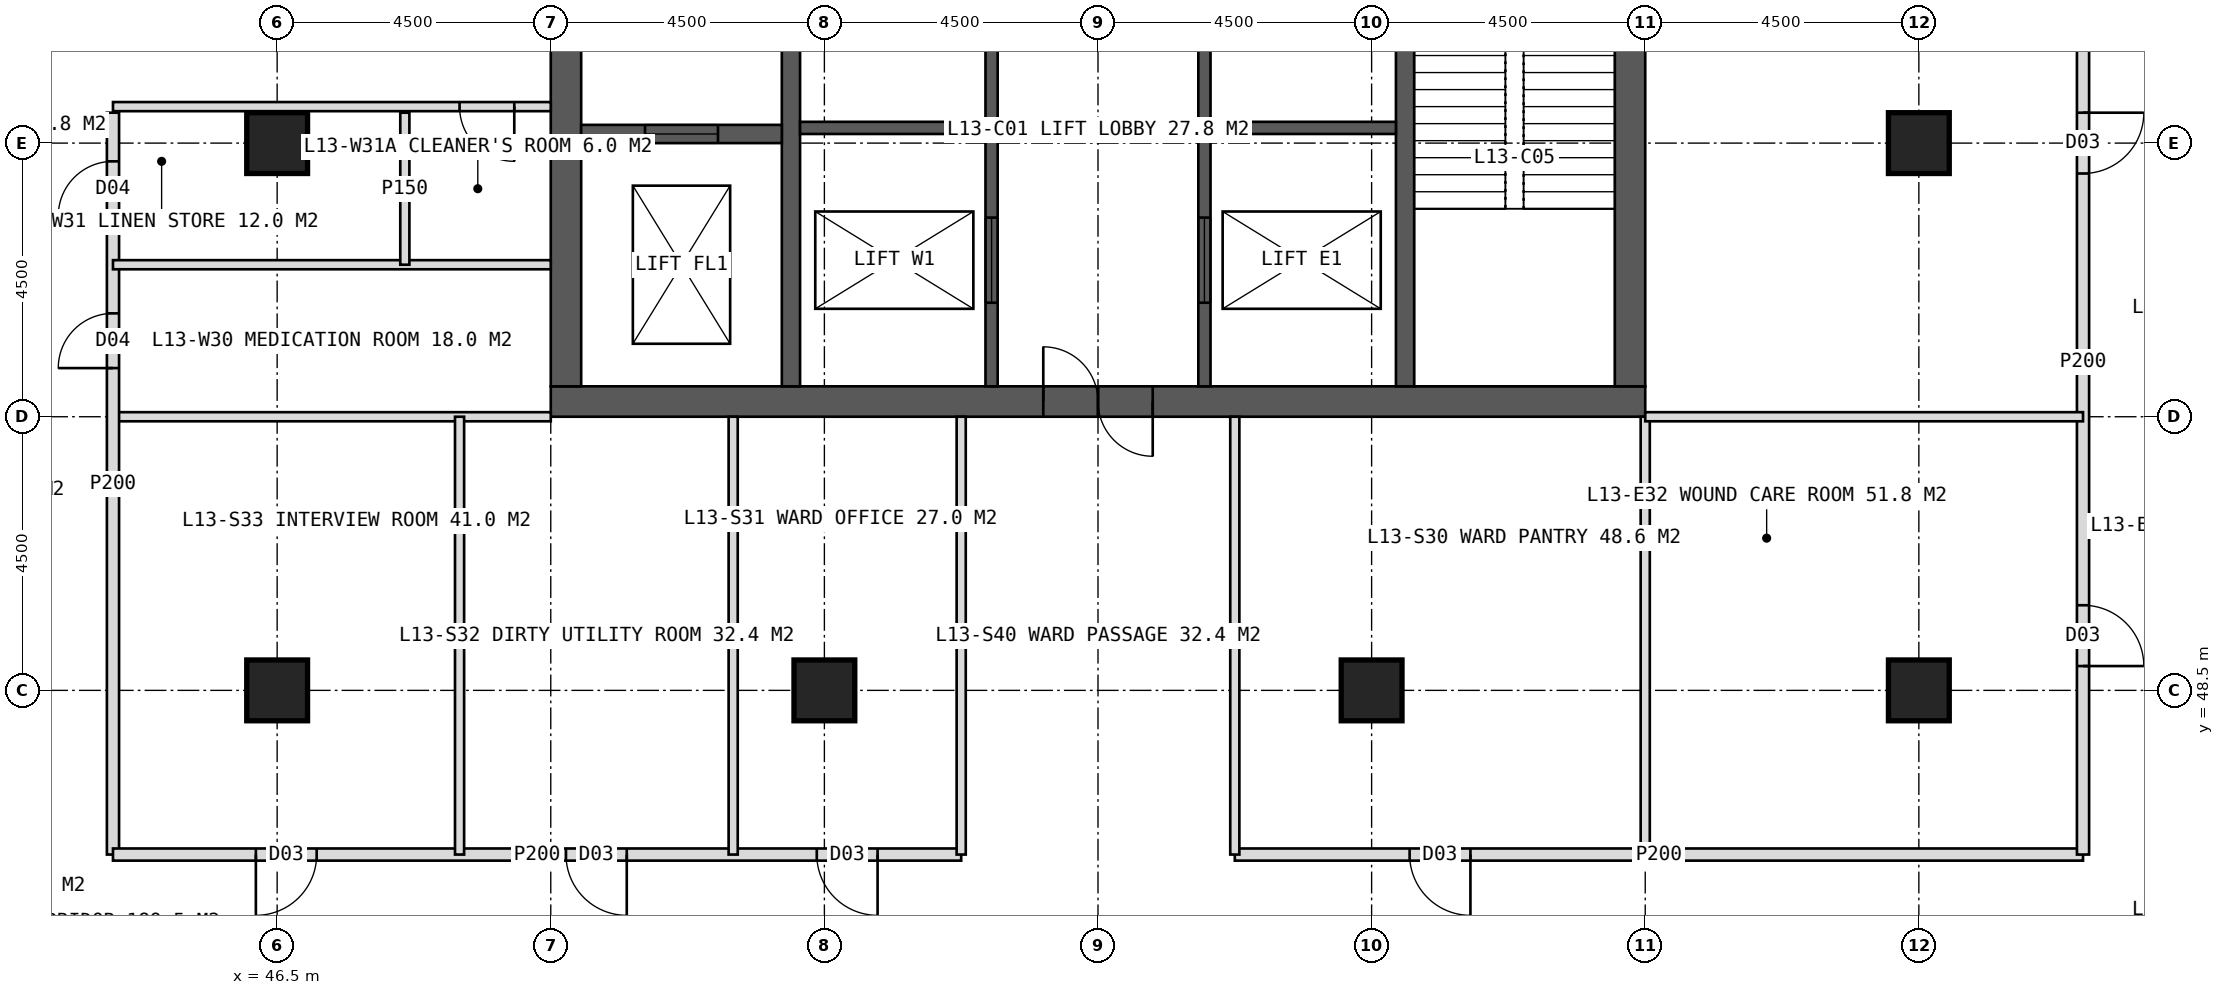
"""IFC4 building model, lengths in metres.
Left out: names, types, materials, properties, quantities, classifications, styles, units other than length and angle.
Written with IfcOpenShell. Run it as: python <this file> out.ifc"""

import sys

from ifc_helpers import new_model, si_unit, direction, frame, frame_2d, origin, origin_2d, place, context, subcontext, project, spatial, rectangle, hollow_rectangle, extrude, element, fill, save


model = new_model("IFC4")
c1 = context("Model", 3, precision=1e-05, world=origin(), true_north=direction((0.0, 1.0)))
c2 = subcontext(c1, "Body", "Model", "MODEL_VIEW")
j1 = project(units=[si_unit("LENGTHUNIT", "METRE"), si_unit("PLANEANGLEUNIT", "RADIAN")], contexts=[c1])
p1 = place(None, origin())
s1 = spatial("IfcSite", under=j1, at=p1, CompositionType="ELEMENT")
p2 = place(p1, origin())
s2 = spatial("IfcBuilding", under=s1, at=p2, CompositionType="ELEMENT")
p3 = place(p2, frame((0.0, 0.0, 59.0)))
s3 = spatial("IfcBuildingStorey", under=s2, at=p3, CompositionType="ELEMENT", Elevation=59.0)
p4 = place(p3, frame((51.0, 53.25, 0.0), z_axis=(0.0, 0.0, 1.0), x_axis=(1.0, 0.0, 0.0)))
e1 = element("IfcWall", 1, at=p4, inside=s3, PredefinedType="SHEAR", context=c2, shape_type="SweptSolid", body=[
    extrude(rectangle(XDim=18.0, YDim=0.5, at=frame_2d((9.0, 0.0))), origin(), (0.0, 0.0, 1.0), 4.0),
])
p5 = place(p4, frame((8.1, 0.0, 0.0)))
e2 = element("IfcOpeningElement", 2, at=p5, cuts=e1, PredefinedType="OPENING", context=c2, shape_type="SweptSolid", body=[
    extrude(rectangle(XDim=1.8, YDim=2.2, at=frame_2d((0.9, 1.1))), frame((0.0, 0.26, 0.0), z_axis=(0.0, -1.0, 0.0), x_axis=(1.0, 0.0, 0.0)), (0.0, 0.0, 1.0), 0.52),
])
p6 = place(p3, frame((51.25, 53.5, 0.0), z_axis=(0.0, 0.0, 1.0), x_axis=(0.0, 1.0, 0.0)))
e3 = element("IfcWall", 3, at=p6, inside=s3, PredefinedType="SHEAR", context=c2, shape_type="SweptSolid", body=[
    extrude(rectangle(XDim=17.0, YDim=0.5, at=frame_2d((8.5, 0.0))), origin(), (0.0, 0.0, 1.0), 4.0),
])
p7 = place(p6, frame((6.0, 0.0, 0.0)))
e4 = element("IfcOpeningElement", 4, at=p7, cuts=e3, PredefinedType="OPENING", context=c2, shape_type="SweptSolid", body=[
    extrude(rectangle(XDim=1.5, YDim=2.2, at=frame_2d((0.75, 1.1))), frame((0.0, 0.26, 0.0), z_axis=(0.0, -1.0, 0.0), x_axis=(1.0, 0.0, 0.0)), (0.0, 0.0, 1.0), 0.52),
])
p8 = place(p3, frame((68.75, 53.5, 0.0), z_axis=(0.0, 0.0, 1.0), x_axis=(0.0, 1.0, 0.0)))
e5 = element("IfcWall", 5, at=p8, inside=s3, PredefinedType="SHEAR", context=c2, shape_type="SweptSolid", body=[
    extrude(rectangle(XDim=17.0, YDim=0.5, at=frame_2d((8.5, 0.0))), origin(), (0.0, 0.0, 1.0), 4.0),
])
p9 = place(p8, frame((9.5, 0.0, 0.0)))
e6 = element("IfcOpeningElement", 6, at=p9, cuts=e5, PredefinedType="OPENING", context=c2, shape_type="SweptSolid", body=[
    extrude(rectangle(XDim=1.5, YDim=2.2, at=frame_2d((0.75, 1.1))), frame((0.0, 0.26, 0.0), z_axis=(0.0, -1.0, 0.0), x_axis=(1.0, 0.0, 0.0)), (0.0, 0.0, 1.0), 0.52),
])
for number, where, z_axis, x_axis in (
    (7, (54.95, 53.5, 0.0), (0.0, 0.0, 1.0), (0.0, 1.0, 0.0)),
    (8, (65.05, 53.5, 0.0), (0.0, 0.0, 1.0), (0.0, 1.0, 0.0)),
):
    element("IfcWall", number, at=place(p3, frame(where, z_axis=z_axis, x_axis=x_axis)), inside=s3, PredefinedType="SHEAR", context=c2, shape_type="SweptSolid", body=[
        extrude(rectangle(XDim=17.0, YDim=0.3, at=frame_2d((8.5, 0.0))), origin(), (0.0, 0.0, 1.0), 4.0),
    ])
p10 = place(p3, frame((58.25, 53.5, 0.0), z_axis=(0.0, 0.0, 1.0), x_axis=(0.0, 1.0, 0.0)))
e9 = element("IfcWall", 9, at=p10, inside=s3, PredefinedType="SHEAR", context=c2, shape_type="SweptSolid", body=[
    extrude(rectangle(XDim=17.0, YDim=0.2, at=frame_2d((8.5, 0.0))), origin(), (0.0, 0.0, 1.0), 4.0),
])
p11 = place(p10, frame((1.375, 0.0, 0.0)))
e10 = element("IfcOpeningElement", 10, at=p11, cuts=e9, PredefinedType="OPENING", context=c2, shape_type="SweptSolid", body=[
    extrude(rectangle(XDim=1.4, YDim=2.2, at=frame_2d((0.7, 1.1))), frame((0.0, 0.11, 0.0), z_axis=(0.0, -1.0, 0.0), x_axis=(1.0, 0.0, 0.0)), (0.0, 0.0, 1.0), 0.22),
])
p12 = place(p10, frame((5.675, 0.0, 0.0)))
e11 = element("IfcOpeningElement", 11, at=p12, cuts=e9, PredefinedType="OPENING", context=c2, shape_type="SweptSolid", body=[
    extrude(rectangle(XDim=1.4, YDim=2.2, at=frame_2d((0.7, 1.1))), frame((0.0, 0.11, 0.0), z_axis=(0.0, -1.0, 0.0), x_axis=(1.0, 0.0, 0.0)), (0.0, 0.0, 1.0), 0.22),
])
p13 = place(p3, frame((61.75, 53.5, 0.0), z_axis=(0.0, 0.0, 1.0), x_axis=(0.0, 1.0, 0.0)))
e12 = element("IfcWall", 12, at=p13, inside=s3, PredefinedType="SHEAR", context=c2, shape_type="SweptSolid", body=[
    extrude(rectangle(XDim=17.0, YDim=0.2, at=frame_2d((8.5, 0.0))), origin(), (0.0, 0.0, 1.0), 4.0),
])
p14 = place(p13, frame((1.375, 0.0, 0.0)))
e13 = element("IfcOpeningElement", 13, at=p14, cuts=e12, PredefinedType="OPENING", context=c2, shape_type="SweptSolid", body=[
    extrude(rectangle(XDim=1.4, YDim=2.2, at=frame_2d((0.7, 1.1))), frame((0.0, 0.11, 0.0), z_axis=(0.0, -1.0, 0.0), x_axis=(1.0, 0.0, 0.0)), (0.0, 0.0, 1.0), 0.22),
])
p15 = place(p13, frame((5.675, 0.0, 0.0)))
e14 = element("IfcOpeningElement", 14, at=p15, cuts=e12, PredefinedType="OPENING", context=c2, shape_type="SweptSolid", body=[
    extrude(rectangle(XDim=1.4, YDim=2.2, at=frame_2d((0.7, 1.1))), frame((0.0, 0.11, 0.0), z_axis=(0.0, -1.0, 0.0), x_axis=(1.0, 0.0, 0.0)), (0.0, 0.0, 1.0), 0.22),
])
for number, where, z_axis, x_axis in (
    (15, (55.1, 57.75, 0.0), (0.0, 0.0, 1.0), (1.0, 0.0, 0.0)),
    (16, (61.85, 57.75, 0.0), (0.0, 0.0, 1.0), (1.0, 0.0, 0.0)),
):
    element("IfcWall", number, at=place(p3, frame(where, z_axis=z_axis, x_axis=x_axis)), inside=s3, PredefinedType="SHEAR", context=c2, shape_type="SweptSolid", body=[
        extrude(rectangle(XDim=3.05, YDim=0.2, at=frame_2d((1.525, 0.0))), origin(), (0.0, 0.0, 1.0), 4.0),
    ])
p16 = place(p3, frame((51.5, 57.65, 0.0), z_axis=(0.0, 0.0, 1.0), x_axis=(1.0, 0.0, 0.0)))
e17 = element("IfcWall", 17, at=p16, inside=s3, PredefinedType="SHEAR", context=c2, shape_type="SweptSolid", body=[
    extrude(rectangle(XDim=3.3, YDim=0.3, at=frame_2d((1.65, 0.0))), origin(), (0.0, 0.0, 1.0), 4.0),
])
p17 = place(p16, frame((1.05, 0.0, 0.0)))
e18 = element("IfcOpeningElement", 18, at=p17, cuts=e17, PredefinedType="OPENING", context=c2, shape_type="SweptSolid", body=[
    extrude(rectangle(XDim=1.2, YDim=2.2, at=frame_2d((0.6, 1.1))), frame((0.0, 0.16, 0.0), z_axis=(0.0, -1.0, 0.0), x_axis=(1.0, 0.0, 0.0)), (0.0, 0.0, 1.0), 0.32),
])
for number, where, z_axis, x_axis in (
    (19, (46.5, 48.5, 0.0), (0.0, 0.0, 1.0), (1.0, 0.0, 0.0)),
    (20, (73.5, 48.5, 0.0), (0.0, 0.0, 1.0), (1.0, 0.0, 0.0)),
    (21, (55.5, 48.5, 0.0), (0.0, 0.0, 1.0), (1.0, 0.0, 0.0)),
    (22, (64.5, 48.5, 0.0), (0.0, 0.0, 1.0), (1.0, 0.0, 0.0)),
    (23, (46.5, 57.5, 0.0), (0.0, 0.0, 1.0), (1.0, 0.0, 0.0)),
    (24, (73.5, 57.5, 0.0), (0.0, 0.0, 1.0), (1.0, 0.0, 0.0)),
):
    element("IfcColumn", number, at=place(p3, frame(where, z_axis=z_axis, x_axis=x_axis)), inside=s3, PredefinedType="COLUMN", context=c2, shape_type="SweptSolid", body=[
        extrude(hollow_rectangle(XDim=1.0, YDim=1.0, WallThickness=0.1, at=origin_2d()), origin(), (0.0, 0.0, 1.0), 4.0),
    ])
p18 = place(p3, frame((51.0, 53.0, 0.0), z_axis=(0.0, 0.0, 1.0), x_axis=(-1.0, 0.0, 0.0)))
e25 = element("IfcWall", 25, at=p18, inside=s3, PredefinedType="PARTITIONING", context=c2, shape_type="SweptSolid", body=[
    extrude(rectangle(XDim=7.2, YDim=0.15, at=frame_2d((3.6, 0.0))), origin(), (0.0, 0.0, 1.0), 3.75),
])
p19 = place(p3, frame((43.8, 45.8, 0.0), z_axis=(0.0, 0.0, 1.0), x_axis=(0.0, 1.0, 0.0)))
e26 = element("IfcWall", 26, at=p19, inside=s3, PredefinedType="PARTITIONING", context=c2, shape_type="SweptSolid", body=[
    extrude(rectangle(XDim=12.2, YDim=0.2, at=frame_2d((6.1, 0.0))), origin(), (0.0, 0.0, 1.0), 3.75),
])
p20 = place(p19, frame((8.0, 0.0, 0.0)))
e27 = element("IfcOpeningElement", 27, at=p20, cuts=e26, PredefinedType="OPENING", context=c2, shape_type="SweptSolid", body=[
    extrude(rectangle(XDim=0.9, YDim=2.1, at=frame_2d((0.45, 1.05))), frame((0.0, 0.11, 0.0), z_axis=(0.0, -1.0, 0.0), x_axis=(1.0, 0.0, 0.0)), (0.0, 0.0, 1.0), 0.22),
])
p21 = place(p19, frame((10.5, 0.0, 0.0)))
e28 = element("IfcOpeningElement", 28, at=p21, cuts=e26, PredefinedType="OPENING", context=c2, shape_type="SweptSolid", body=[
    extrude(rectangle(XDim=0.9, YDim=2.1, at=frame_2d((0.45, 1.05))), frame((0.0, 0.11, 0.0), z_axis=(0.0, -1.0, 0.0), x_axis=(1.0, 0.0, 0.0)), (0.0, 0.0, 1.0), 0.22),
])
p22 = place(p3, frame((51.0, 58.1, 0.0), z_axis=(0.0, 0.0, 1.0), x_axis=(-1.0, 0.0, 0.0)))
e29 = element("IfcWall", 29, at=p22, inside=s3, PredefinedType="PARTITIONING", context=c2, shape_type="SweptSolid", body=[
    extrude(rectangle(XDim=7.2, YDim=0.15, at=frame_2d((3.6, 0.0))), origin(), (0.0, 0.0, 1.0), 3.75),
])
p23 = place(p22, frame((0.6, 0.0, 0.0)))
e30 = element("IfcOpeningElement", 30, at=p23, cuts=e29, PredefinedType="OPENING", context=c2, shape_type="SweptSolid", body=[
    extrude(rectangle(XDim=0.9, YDim=2.1, at=frame_2d((0.45, 1.05))), frame((0.0, 0.085, 0.0), z_axis=(0.0, -1.0, 0.0), x_axis=(1.0, 0.0, 0.0)), (0.0, 0.0, 1.0), 0.17),
])
p24 = place(p3, frame((51.0, 55.5, 0.0), z_axis=(0.0, 0.0, 1.0), x_axis=(-1.0, 0.0, 0.0)))
e31 = element("IfcWall", 31, at=p24, inside=s3, PredefinedType="PARTITIONING", context=c2, shape_type="SweptSolid", body=[
    extrude(rectangle(XDim=7.2, YDim=0.15, at=frame_2d((3.6, 0.0))), origin(), (0.0, 0.0, 1.0), 3.75),
])
p25 = place(p3, frame((48.6, 55.5, 0.0), z_axis=(0.0, 0.0, 1.0), x_axis=(0.0, 1.0, 0.0)))
e32 = element("IfcWall", 32, at=p25, inside=s3, PredefinedType="PARTITIONING", context=c2, shape_type="SweptSolid", body=[
    extrude(rectangle(XDim=2.5, YDim=0.15, at=frame_2d((1.25, 0.0))), origin(), (0.0, 0.0, 1.0), 3.75),
])
p26 = place(p3, frame((69.0, 53.0, 0.0), z_axis=(0.0, 0.0, 1.0), x_axis=(0.0, -1.0, 0.0)))
e33 = element("IfcWall", 33, at=p26, inside=s3, PredefinedType="PARTITIONING", context=c2, shape_type="SweptSolid", body=[
    extrude(rectangle(XDim=7.2, YDim=0.15, at=frame_2d((3.6, 0.0))), origin(), (0.0, 0.0, 1.0), 3.75),
])
p27 = place(p3, frame((76.2, 45.8, 0.0), z_axis=(0.0, 0.0, 1.0), x_axis=(-1.0, 0.0, 0.0)))
e34 = element("IfcWall", 34, at=p27, inside=s3, PredefinedType="PARTITIONING", context=c2, shape_type="SweptSolid", body=[
    extrude(rectangle(XDim=13.95, YDim=0.2, at=frame_2d((6.975, 0.0))), origin(), (0.0, 0.0, 1.0), 3.75),
])
p28 = place(p27, frame((10.075, 0.0, 0.0)))
e35 = element("IfcOpeningElement", 35, at=p28, cuts=e34, PredefinedType="OPENING", context=c2, shape_type="SweptSolid", body=[
    extrude(rectangle(XDim=1.0, YDim=2.1, at=frame_2d((0.5, 1.05))), frame((0.0, 0.11, 0.0), z_axis=(0.0, -1.0, 0.0), x_axis=(1.0, 0.0, 0.0)), (0.0, 0.0, 1.0), 0.22),
])
p29 = place(p3, frame((57.75, 45.8, 0.0), z_axis=(0.0, 0.0, 1.0), x_axis=(-1.0, 0.0, 0.0)))
e36 = element("IfcWall", 36, at=p29, inside=s3, PredefinedType="PARTITIONING", context=c2, shape_type="SweptSolid", body=[
    extrude(rectangle(XDim=13.95, YDim=0.2, at=frame_2d((6.975, 0.0))), origin(), (0.0, 0.0, 1.0), 3.75),
])
p30 = place(p29, frame((1.375, 0.0, 0.0)))
e37 = element("IfcOpeningElement", 37, at=p30, cuts=e36, PredefinedType="OPENING", context=c2, shape_type="SweptSolid", body=[
    extrude(rectangle(XDim=1.0, YDim=2.1, at=frame_2d((0.5, 1.05))), frame((0.0, 0.11, 0.0), z_axis=(0.0, -1.0, 0.0), x_axis=(1.0, 0.0, 0.0)), (0.0, 0.0, 1.0), 0.22),
])
p31 = place(p29, frame((5.5, 0.0, 0.0)))
e38 = element("IfcOpeningElement", 38, at=p31, cuts=e36, PredefinedType="OPENING", context=c2, shape_type="SweptSolid", body=[
    extrude(rectangle(XDim=1.0, YDim=2.1, at=frame_2d((0.5, 1.05))), frame((0.0, 0.11, 0.0), z_axis=(0.0, -1.0, 0.0), x_axis=(1.0, 0.0, 0.0)), (0.0, 0.0, 1.0), 0.22),
])
p32 = place(p29, frame((10.6, 0.0, 0.0)))
e39 = element("IfcOpeningElement", 39, at=p32, cuts=e36, PredefinedType="OPENING", context=c2, shape_type="SweptSolid", body=[
    extrude(rectangle(XDim=1.0, YDim=2.1, at=frame_2d((0.5, 1.05))), frame((0.0, 0.11, 0.0), z_axis=(0.0, -1.0, 0.0), x_axis=(1.0, 0.0, 0.0)), (0.0, 0.0, 1.0), 0.22),
])
for number, where, z_axis, x_axis in (
    (40, (62.25, 53.0, 0.0), (0.0, 0.0, 1.0), (0.0, -1.0, 0.0)),
    (41, (57.75, 53.0, 0.0), (0.0, 0.0, 1.0), (0.0, -1.0, 0.0)),
    (42, (54.0, 53.0, 0.0), (0.0, 0.0, 1.0), (0.0, -1.0, 0.0)),
    (43, (49.5, 53.0, 0.0), (0.0, 0.0, 1.0), (0.0, -1.0, 0.0)),
):
    element("IfcWall", number, at=place(p3, frame(where, z_axis=z_axis, x_axis=x_axis)), inside=s3, PredefinedType="PARTITIONING", context=c2, shape_type="SweptSolid", body=[
        extrude(rectangle(XDim=7.2, YDim=0.15, at=frame_2d((3.6, 0.0))), origin(), (0.0, 0.0, 1.0), 3.75),
    ])
p33 = place(p3, frame((76.2, 62.0, 0.0), z_axis=(0.0, 0.0, 1.0), x_axis=(0.0, -1.0, 0.0)))
e44 = element("IfcWall", 44, at=p33, inside=s3, PredefinedType="PARTITIONING", context=c2, shape_type="SweptSolid", body=[
    extrude(rectangle(XDim=16.2, YDim=0.2, at=frame_2d((8.1, 0.0))), origin(), (0.0, 0.0, 1.0), 3.75),
])
p34 = place(p33, frame((4.0, 0.0, 0.0)))
e45 = element("IfcOpeningElement", 45, at=p34, cuts=e44, PredefinedType="OPENING", context=c2, shape_type="SweptSolid", body=[
    extrude(rectangle(XDim=1.0, YDim=2.1, at=frame_2d((0.5, 1.05))), frame((0.0, 0.11, 0.0), z_axis=(0.0, -1.0, 0.0), x_axis=(1.0, 0.0, 0.0)), (0.0, 0.0, 1.0), 0.22),
])
p35 = place(p33, frame((12.1, 0.0, 0.0)))
e46 = element("IfcOpeningElement", 46, at=p35, cuts=e44, PredefinedType="OPENING", context=c2, shape_type="SweptSolid", body=[
    extrude(rectangle(XDim=1.0, YDim=2.1, at=frame_2d((0.5, 1.05))), frame((0.0, 0.11, 0.0), z_axis=(0.0, -1.0, 0.0), x_axis=(1.0, 0.0, 0.0)), (0.0, 0.0, 1.0), 0.22),
])
p36 = place(p3, frame((69.0, 53.0, 0.0), z_axis=(0.0, 0.0, 1.0), x_axis=(1.0, 0.0, 0.0)))
e47 = element("IfcWall", 47, at=p36, inside=s3, PredefinedType="PARTITIONING", context=c2, shape_type="SweptSolid", body=[
    extrude(rectangle(XDim=7.2, YDim=0.15, at=frame_2d((3.6, 0.0))), origin(), (0.0, 0.0, 1.0), 3.75),
])
p37 = place(p20, origin())
e48 = element("IfcDoor", 48, at=p37, inside=s3, OperationType="SINGLE_SWING_LEFT", PredefinedType="DOOR", context=c2, shape_type="SweptSolid", body=[
    extrude(rectangle(XDim=0.9, YDim=2.1, at=frame_2d((0.45, 1.05))), frame((0.0, 0.025, 0.0), z_axis=(0.0, -1.0, 0.0), x_axis=(1.0, 0.0, 0.0)), (0.0, 0.0, 1.0), 0.05),
])
fill(e27, e48)
p38 = place(p23, origin())
e49 = element("IfcDoor", 49, at=p38, inside=s3, OperationType="SINGLE_SWING_LEFT", PredefinedType="DOOR", context=c2, shape_type="SweptSolid", body=[
    extrude(rectangle(XDim=0.9, YDim=2.1, at=frame_2d((0.45, 1.05))), frame((0.0, 0.025, 0.0), z_axis=(0.0, -1.0, 0.0), x_axis=(1.0, 0.0, 0.0)), (0.0, 0.0, 1.0), 0.05),
])
fill(e30, e49)
p39 = place(p21, origin())
e50 = element("IfcDoor", 50, at=p39, inside=s3, OperationType="SINGLE_SWING_LEFT", PredefinedType="DOOR", context=c2, shape_type="SweptSolid", body=[
    extrude(rectangle(XDim=0.9, YDim=2.1, at=frame_2d((0.45, 1.05))), frame((0.0, 0.025, 0.0), z_axis=(0.0, -1.0, 0.0), x_axis=(1.0, 0.0, 0.0)), (0.0, 0.0, 1.0), 0.05),
])
fill(e28, e50)
p40 = place(p28, origin())
e51 = element("IfcDoor", 51, at=p40, inside=s3, OperationType="SINGLE_SWING_LEFT", PredefinedType="DOOR", context=c2, shape_type="SweptSolid", body=[
    extrude(rectangle(XDim=1.0, YDim=2.1, at=frame_2d((0.5, 1.05))), frame((0.0, 0.025, 0.0), z_axis=(0.0, -1.0, 0.0), x_axis=(1.0, 0.0, 0.0)), (0.0, 0.0, 1.0), 0.05),
])
fill(e35, e51)
p41 = place(p30, origin())
e52 = element("IfcDoor", 52, at=p41, inside=s3, OperationType="SINGLE_SWING_LEFT", PredefinedType="DOOR", context=c2, shape_type="SweptSolid", body=[
    extrude(rectangle(XDim=1.0, YDim=2.1, at=frame_2d((0.5, 1.05))), frame((0.0, 0.025, 0.0), z_axis=(0.0, -1.0, 0.0), x_axis=(1.0, 0.0, 0.0)), (0.0, 0.0, 1.0), 0.05),
])
fill(e37, e52)
p42 = place(p31, origin())
e53 = element("IfcDoor", 53, at=p42, inside=s3, OperationType="SINGLE_SWING_LEFT", PredefinedType="DOOR", context=c2, shape_type="SweptSolid", body=[
    extrude(rectangle(XDim=1.0, YDim=2.1, at=frame_2d((0.5, 1.05))), frame((0.0, 0.025, 0.0), z_axis=(0.0, -1.0, 0.0), x_axis=(1.0, 0.0, 0.0)), (0.0, 0.0, 1.0), 0.05),
])
fill(e38, e53)
p43 = place(p32, origin())
e54 = element("IfcDoor", 54, at=p43, inside=s3, OperationType="SINGLE_SWING_RIGHT", PredefinedType="DOOR", context=c2, shape_type="SweptSolid", body=[
    extrude(rectangle(XDim=1.0, YDim=2.1, at=frame_2d((0.5, 1.05))), frame((0.0, 0.025, 0.0), z_axis=(0.0, -1.0, 0.0), x_axis=(1.0, 0.0, 0.0)), (0.0, 0.0, 1.0), 0.05),
])
fill(e39, e54)
p44 = place(p34, origin())
e55 = element("IfcDoor", 55, at=p44, inside=s3, OperationType="SINGLE_SWING_LEFT", PredefinedType="DOOR", context=c2, shape_type="SweptSolid", body=[
    extrude(rectangle(XDim=1.0, YDim=2.1, at=frame_2d((0.5, 1.05))), frame((0.0, 0.025, 0.0), z_axis=(0.0, -1.0, 0.0), x_axis=(1.0, 0.0, 0.0)), (0.0, 0.0, 1.0), 0.05),
])
fill(e45, e55)
p45 = place(p35, origin())
e56 = element("IfcDoor", 56, at=p45, inside=s3, OperationType="SINGLE_SWING_RIGHT", PredefinedType="DOOR", context=c2, shape_type="SweptSolid", body=[
    extrude(rectangle(XDim=1.0, YDim=2.1, at=frame_2d((0.5, 1.05))), frame((0.0, 0.025, 0.0), z_axis=(0.0, -1.0, 0.0), x_axis=(1.0, 0.0, 0.0)), (0.0, 0.0, 1.0), 0.05),
])
fill(e46, e56)
p46 = place(p5, origin())
e57 = element("IfcDoor", 57, at=p46, inside=s3, OperationType="DOUBLE_DOOR_SINGLE_SWING", PredefinedType="DOOR", context=c2, shape_type="SweptSolid", body=[
    extrude(rectangle(XDim=1.8, YDim=2.2, at=frame_2d((0.9, 1.1))), frame((0.0, 0.025, 0.0), z_axis=(0.0, -1.0, 0.0), x_axis=(1.0, 0.0, 0.0)), (0.0, 0.0, 1.0), 0.05),
])
fill(e2, e57)
p47 = place(p17, origin())
e58 = element("IfcDoor", 58, at=p47, inside=s3, OperationType="SLIDING_TO_LEFT", PredefinedType="DOOR", context=c2, shape_type="SweptSolid", body=[
    extrude(rectangle(XDim=1.2, YDim=2.2, at=frame_2d((0.6, 1.1))), frame((0.0, 0.025, 0.0), z_axis=(0.0, -1.0, 0.0), x_axis=(1.0, 0.0, 0.0)), (0.0, 0.0, 1.0), 0.05),
])
fill(e18, e58)
p48 = place(p11, origin())
e59 = element("IfcDoor", 59, at=p48, inside=s3, OperationType="SLIDING_TO_LEFT", PredefinedType="DOOR", context=c2, shape_type="SweptSolid", body=[
    extrude(rectangle(XDim=1.4, YDim=2.2, at=frame_2d((0.7, 1.1))), frame((0.0, 0.025, 0.0), z_axis=(0.0, -1.0, 0.0), x_axis=(1.0, 0.0, 0.0)), (0.0, 0.0, 1.0), 0.05),
])
fill(e10, e59)
p49 = place(p14, origin())
e60 = element("IfcDoor", 60, at=p49, inside=s3, OperationType="SLIDING_TO_LEFT", PredefinedType="DOOR", context=c2, shape_type="SweptSolid", body=[
    extrude(rectangle(XDim=1.4, YDim=2.2, at=frame_2d((0.7, 1.1))), frame((0.0, 0.025, 0.0), z_axis=(0.0, -1.0, 0.0), x_axis=(1.0, 0.0, 0.0)), (0.0, 0.0, 1.0), 0.05),
])
fill(e13, e60)
save(model, sys.argv[1])
